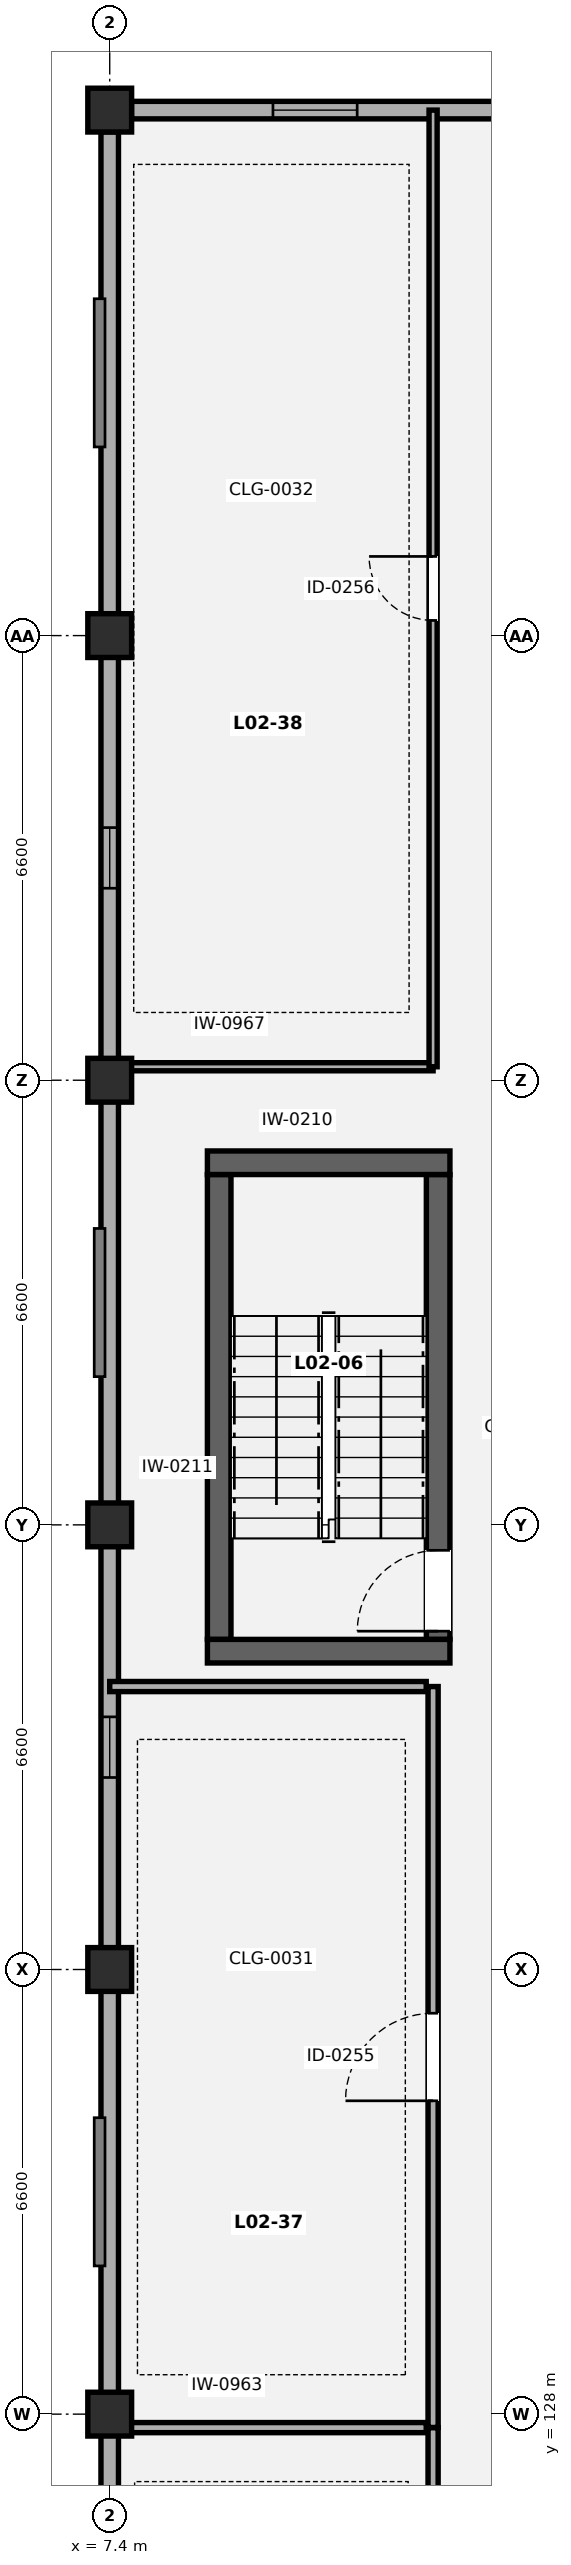
"""IFC4 building model, lengths in metres.
Left out: names, types, materials, properties, quantities, classifications, styles, units other than length and angle.
Written with IfcOpenShell. Run it as: python <this file> out.ifc"""

import sys

from ifc_helpers import new_model, si_unit, direction, frame, frame_2d, origin, origin_2d, place, context, subcontext, project, spatial, rectangle, extrude, element, fill, save


model = new_model("IFC4")
c1 = context("Model", 3, precision=1e-05, world=origin(), true_north=direction((0.0, 1.0)))
c2 = subcontext(c1, "Body", "Model", "MODEL_VIEW")
j1 = project(units=[si_unit("LENGTHUNIT", "METRE"), si_unit("PLANEANGLEUNIT", "RADIAN")], contexts=[c1])
p1 = place(None, origin())
s1 = spatial("IfcSite", under=j1, at=p1, CompositionType="ELEMENT")
p2 = place(p1, origin())
s2 = spatial("IfcBuilding", under=s1, at=p2, CompositionType="ELEMENT")
p3 = place(p2, frame((0.0, 0.0, 9.1)))
s3 = spatial("IfcBuildingStorey", under=s2, at=p3, CompositionType="ELEMENT", Elevation=9.1)
for number, where, z_axis, x_axis in (
    (1, (7.4, 128.0, 0.0), (0.0, 0.0, 1.0), (1.0, 0.0, 0.0)),
    (2, (7.4, 134.6, 0.0), (0.0, 0.0, 1.0), (1.0, 0.0, 0.0)),
    (3, (7.4, 141.2, 0.0), (0.0, 0.0, 1.0), (1.0, 0.0, 0.0)),
    (4, (7.4, 147.8, 0.0), (0.0, 0.0, 1.0), (1.0, 0.0, 0.0)),
    (5, (7.4, 154.4, 0.0), (0.0, 0.0, 1.0), (1.0, 0.0, 0.0)),
    (6, (7.4, 162.2, 0.0), (0.0, 0.0, 1.0), (1.0, 0.0, 0.0)),
):
    element("IfcColumn", number, at=place(p3, frame(where, z_axis=z_axis, x_axis=x_axis)), inside=s3, PredefinedType="COLUMN", context=c2, shape_type="SweptSolid", body=[
        extrude(rectangle(XDim=0.65, YDim=0.65, at=origin_2d()), origin(), (0.0, 0.0, 1.0), 4.2),
    ])
p4 = place(p3, frame((7.4, 95.323, 0.0), z_axis=(0.0, 0.0, 1.0), x_axis=(0.0, 1.0, 0.0)))
e7 = element("IfcWall", 7, at=p4, inside=s3, PredefinedType="SOLIDWALL", context=c2, shape_type="SweptSolid", body=[
    extrude(rectangle(XDim=66.554, YDim=0.26, at=frame_2d((33.277, 0.0))), origin(), (0.0, 0.0, 1.0), 2.885),
])
p5 = place(p4, frame((15.727, 0.0, 0.85)))
e8 = element("IfcOpeningElement", 8, at=p5, cuts=e7, PredefinedType="OPENING", context=c2, shape_type="SweptSolid", body=[
    extrude(rectangle(XDim=0.9, YDim=1.35, at=frame_2d((0.45, 0.675))), frame((0.0, 0.14, 0.0), z_axis=(0.0, -1.0, 0.0), x_axis=(1.0, 0.0, 0.0)), (0.0, 0.0, 1.0), 0.28),
])
p6 = place(p4, frame((28.927, 0.0, 0.85)))
e9 = element("IfcOpeningElement", 9, at=p6, cuts=e7, PredefinedType="OPENING", context=c2, shape_type="SweptSolid", body=[
    extrude(rectangle(XDim=0.9, YDim=1.35, at=frame_2d((0.45, 0.675))), frame((0.0, 0.14, 0.0), z_axis=(0.0, -1.0, 0.0), x_axis=(1.0, 0.0, 0.0)), (0.0, 0.0, 1.0), 0.28),
])
p7 = place(p4, frame((42.127, 0.0, 0.85)))
e10 = element("IfcOpeningElement", 10, at=p7, cuts=e7, PredefinedType="OPENING", context=c2, shape_type="SweptSolid", body=[
    extrude(rectangle(XDim=0.9, YDim=1.35, at=frame_2d((0.45, 0.675))), frame((0.0, 0.14, 0.0), z_axis=(0.0, -1.0, 0.0), x_axis=(1.0, 0.0, 0.0)), (0.0, 0.0, 1.0), 0.28),
])
p8 = place(p4, frame((55.327, 0.0, 0.85)))
e11 = element("IfcOpeningElement", 11, at=p8, cuts=e7, PredefinedType="OPENING", context=c2, shape_type="SweptSolid", body=[
    extrude(rectangle(XDim=0.9, YDim=1.35, at=frame_2d((0.45, 0.675))), frame((0.0, 0.14, 0.0), z_axis=(0.0, -1.0, 0.0), x_axis=(1.0, 0.0, 0.0)), (0.0, 0.0, 1.0), 0.28),
])
p9 = place(p3, frame((7.723, 162.2, 0.0), z_axis=(0.0, 0.0, 1.0), x_axis=(1.0, 0.0, 0.0)))
e12 = element("IfcWall", 12, at=p9, inside=s3, PredefinedType="SOLIDWALL", context=c2, shape_type="SweptSolid", body=[
    extrude(rectangle(XDim=5.954, YDim=0.26, at=frame_2d((2.977, 0.0))), origin(), (0.0, 0.0, 1.0), 2.48),
])
p10 = place(p9, frame((2.1, 0.0, 0.85)))
e13 = element("IfcOpeningElement", 13, at=p10, cuts=e12, PredefinedType="OPENING", context=c2, shape_type="SweptSolid", body=[
    extrude(rectangle(XDim=1.25, YDim=1.4, at=frame_2d((0.625, 0.7))), frame((0.0, 0.14, 0.0), z_axis=(0.0, -1.0, 0.0), x_axis=(1.0, 0.0, 0.0)), (0.0, 0.0, 1.0), 0.28),
])
for number, where, z_axis, x_axis in (
    (14, (8.85, 139.325, 0.0), (0.0, 0.0, 1.0), (1.0, 0.0, 0.0)),
    (15, (8.85, 146.575, 0.0), (0.0, 0.0, 1.0), (1.0, 0.0, 0.0)),
):
    element("IfcWall", number, at=place(p3, frame(where, z_axis=z_axis, x_axis=x_axis)), inside=s3, PredefinedType="SHEAR", context=c2, shape_type="SweptSolid", body=[
        extrude(rectangle(XDim=3.6, YDim=0.35, at=frame_2d((1.8, 0.0))), origin(), (0.0, 0.0, 1.0), 3.85),
    ])
p11 = place(p3, frame((9.025, 139.502, 0.0), z_axis=(0.0, 0.0, 1.0), x_axis=(0.0, 1.0, 0.0)))
e16 = element("IfcWall", 16, at=p11, inside=s3, PredefinedType="SHEAR", context=c2, shape_type="SweptSolid", body=[
    extrude(rectangle(XDim=6.896, YDim=0.35, at=frame_2d((3.448, 0.0))), origin(), (0.0, 0.0, 1.0), 3.85),
])
p12 = place(p3, frame((12.275, 139.502, 0.0), z_axis=(0.0, 0.0, 1.0), x_axis=(0.0, 1.0, 0.0)))
e17 = element("IfcWall", 17, at=p12, inside=s3, PredefinedType="SHEAR", context=c2, shape_type="SweptSolid", body=[
    extrude(rectangle(XDim=6.896, YDim=0.35, at=frame_2d((3.448, 0.0))), origin(), (0.0, 0.0, 1.0), 3.85),
])
p13 = place(p12, frame((0.12, 0.0, 0.0)))
e18 = element("IfcOpeningElement", 18, at=p13, cuts=e17, PredefinedType="OPENING", context=c2, shape_type="SweptSolid", body=[
    extrude(rectangle(XDim=1.2, YDim=2.15, at=frame_2d((0.6, 1.075))), frame((0.0, 0.185, 0.0), z_axis=(0.0, -1.0, 0.0), x_axis=(1.0, 0.0, 0.0)), (0.0, 0.0, 1.0), 0.37),
])
p14 = place(p3, frame((7.4, 127.8, 0.0), z_axis=(0.0, 0.0, 1.0), x_axis=(1.0, 0.0, 0.0)))
e19 = element("IfcWall", 19, at=p14, inside=s3, PredefinedType="PARTITIONING", context=c2, shape_type="SweptSolid", body=[
    extrude(rectangle(XDim=4.698, YDim=0.15, at=frame_2d((2.349, 0.0))), origin(), (0.0, 0.0, 1.0), 2.435),
])
p15 = place(p3, frame((12.2, 114.502, 0.0), z_axis=(0.0, 0.0, 1.0), x_axis=(0.0, 1.0, 0.0)))
e20 = element("IfcWall", 20, at=p15, inside=s3, PredefinedType="PARTITIONING", context=c2, shape_type="SweptSolid", body=[
    extrude(rectangle(XDim=13.298, YDim=0.15, at=frame_2d((6.649, 0.0))), origin(), (0.0, 0.0, 1.0), 3.85),
])
p16 = place(p15, frame((5.649, 0.0, 0.0)))
e21 = element("IfcOpeningElement", 21, at=p16, cuts=e20, PredefinedType="OPENING", context=c2, shape_type="SweptSolid", body=[
    extrude(rectangle(XDim=1.3, YDim=2.2, at=frame_2d((0.65, 1.1))), frame((0.0, 0.085, 0.0), z_axis=(0.0, -1.0, 0.0), x_axis=(1.0, 0.0, 0.0)), (0.0, 0.0, 1.0), 0.17),
])
p17 = place(p3, frame((7.4, 138.8, 0.0), z_axis=(0.0, 0.0, 1.0), x_axis=(1.0, 0.0, 0.0)))
e22 = element("IfcWall", 22, at=p17, inside=s3, PredefinedType="PARTITIONING", context=c2, shape_type="SweptSolid", body=[
    extrude(rectangle(XDim=4.698, YDim=0.15, at=frame_2d((2.349, 0.0))), origin(), (0.0, 0.0, 1.0), 3.85),
])
p18 = place(p3, frame((12.2, 127.802, 0.0), z_axis=(0.0, 0.0, 1.0), x_axis=(0.0, 1.0, 0.0)))
e23 = element("IfcWall", 23, at=p18, inside=s3, PredefinedType="PARTITIONING", context=c2, shape_type="SweptSolid", body=[
    extrude(rectangle(XDim=10.998, YDim=0.15, at=frame_2d((5.499, 0.0))), origin(), (0.0, 0.0, 1.0), 3.85),
])
p19 = place(p18, frame((4.849, 0.0, 0.0)))
e24 = element("IfcOpeningElement", 24, at=p19, cuts=e23, PredefinedType="OPENING", context=c2, shape_type="SweptSolid", body=[
    extrude(rectangle(XDim=1.3, YDim=2.2, at=frame_2d((0.65, 1.1))), frame((0.0, 0.085, 0.0), z_axis=(0.0, -1.0, 0.0), x_axis=(1.0, 0.0, 0.0)), (0.0, 0.0, 1.0), 0.17),
])
p20 = place(p3, frame((7.4, 148.0, 0.0), z_axis=(0.0, 0.0, 1.0), x_axis=(1.0, 0.0, 0.0)))
e25 = element("IfcWall", 25, at=p20, inside=s3, PredefinedType="PARTITIONING", context=c2, shape_type="SweptSolid", body=[
    extrude(rectangle(XDim=4.8, YDim=0.12, at=frame_2d((2.4, 0.0))), origin(), (0.0, 0.0, 1.0), 2.435),
])
p21 = place(p3, frame((12.2, 148.0, 0.0), z_axis=(0.0, 0.0, 1.0), x_axis=(0.0, 1.0, 0.0)))
e26 = element("IfcWall", 26, at=p21, inside=s3, PredefinedType="PARTITIONING", context=c2, shape_type="SweptSolid", body=[
    extrude(rectangle(XDim=14.2, YDim=0.12, at=frame_2d((7.1, 0.0))), origin(), (0.0, 0.0, 1.0), 3.85),
])
p22 = place(p21, frame((6.625, 0.0, 0.0)))
e27 = element("IfcOpeningElement", 27, at=p22, cuts=e26, PredefinedType="OPENING", context=c2, shape_type="SweptSolid", body=[
    extrude(rectangle(XDim=0.95, YDim=2.1, at=frame_2d((0.475, 1.05))), frame((0.0, 0.07, 0.0), z_axis=(0.0, -1.0, 0.0), x_axis=(1.0, 0.0, 0.0)), (0.0, 0.0, 1.0), 0.14),
])
p23 = place(p7, origin())
e28 = element("IfcWindow", 28, at=p23, inside=s3, PartitioningType="SINGLE_PANEL", PredefinedType="WINDOW", context=c2, shape_type="SweptSolid", body=[
    extrude(rectangle(XDim=0.9, YDim=1.35, at=frame_2d((0.45, 0.675))), frame((0.0, 0.03, 0.0), z_axis=(0.0, -1.0, 0.0), x_axis=(1.0, 0.0, 0.0)), (0.0, 0.0, 1.0), 0.06),
])
fill(e10, e28)
p24 = place(p8, origin())
e29 = element("IfcWindow", 29, at=p24, inside=s3, PartitioningType="SINGLE_PANEL", PredefinedType="WINDOW", context=c2, shape_type="SweptSolid", body=[
    extrude(rectangle(XDim=0.9, YDim=1.35, at=frame_2d((0.45, 0.675))), frame((0.0, 0.03, 0.0), z_axis=(0.0, -1.0, 0.0), x_axis=(1.0, 0.0, 0.0)), (0.0, 0.0, 1.0), 0.06),
])
fill(e11, e29)
p25 = place(p10, origin())
e30 = element("IfcWindow", 30, at=p25, inside=s3, PartitioningType="SINGLE_PANEL", PredefinedType="WINDOW", context=c2, shape_type="SweptSolid", body=[
    extrude(rectangle(XDim=1.25, YDim=1.4, at=frame_2d((0.625, 0.7))), frame((0.0, 0.03, 0.0), z_axis=(0.0, -1.0, 0.0), x_axis=(1.0, 0.0, 0.0)), (0.0, 0.0, 1.0), 0.06),
])
fill(e13, e30)
p26 = place(p13, origin())
e31 = element("IfcDoor", 31, at=p26, inside=s3, OperationType="SINGLE_SWING_LEFT", PredefinedType="DOOR", context=c2, shape_type="SweptSolid", body=[
    extrude(rectangle(XDim=1.2, YDim=2.15, at=frame_2d((0.6, 1.075))), frame((0.0, 0.025, 0.0), z_axis=(0.0, -1.0, 0.0), x_axis=(1.0, 0.0, 0.0)), (0.0, 0.0, 1.0), 0.05),
])
fill(e18, e31)
p27 = place(p19, origin())
e32 = element("IfcDoor", 32, at=p27, inside=s3, OperationType="SINGLE_SWING_LEFT", PredefinedType="DOOR", context=c2, shape_type="SweptSolid", body=[
    extrude(rectangle(XDim=1.3, YDim=2.2, at=frame_2d((0.65, 1.1))), frame((0.0, 0.025, 0.0), z_axis=(0.0, -1.0, 0.0), x_axis=(1.0, 0.0, 0.0)), (0.0, 0.0, 1.0), 0.05),
])
fill(e24, e32)
p28 = place(p22, origin())
e33 = element("IfcDoor", 33, at=p28, inside=s3, OperationType="SINGLE_SWING_RIGHT", PredefinedType="DOOR", context=c2, shape_type="SweptSolid", body=[
    extrude(rectangle(XDim=0.95, YDim=2.1, at=frame_2d((0.475, 1.05))), frame((0.0, 0.025, 0.0), z_axis=(0.0, -1.0, 0.0), x_axis=(1.0, 0.0, 0.0)), (0.0, 0.0, 1.0), 0.05),
])
fill(e27, e33)
save(model, sys.argv[1])
